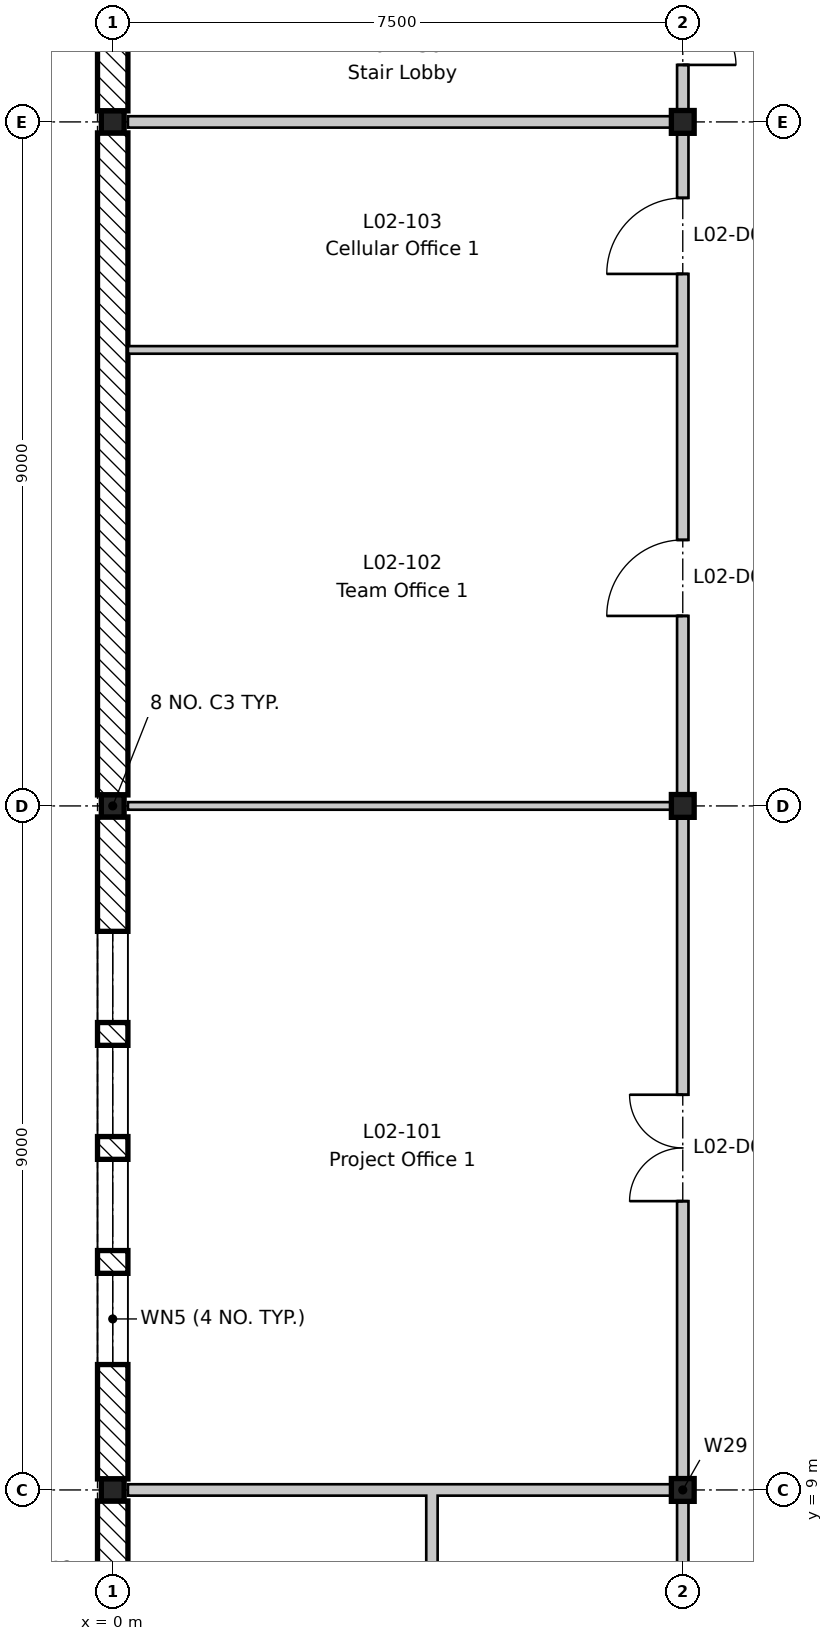
"""IFC4 building model, lengths in metres.
Left out: names, types, materials, properties, quantities, classifications, styles, units other than length and angle.
Written with IfcOpenShell. Run it as: python <this file> out.ifc"""

import sys

from ifc_helpers import new_model, si_unit, direction, frame, frame_2d, origin, origin_2d, place, context, subcontext, project, spatial, rectangle, i_section, extrude, element, fill, save


model = new_model("IFC4")
c1 = context("Model", 3, precision=1e-05, world=origin(), true_north=direction((0.0, 1.0)))
c2 = subcontext(c1, "Body", "Model", "MODEL_VIEW")
j1 = project(units=[si_unit("LENGTHUNIT", "METRE"), si_unit("PLANEANGLEUNIT", "RADIAN")], contexts=[c1])
p1 = place(None, origin())
s1 = spatial("IfcSite", under=j1, at=p1, CompositionType="ELEMENT")
p2 = place(p1, origin())
s2 = spatial("IfcBuilding", under=s1, at=p2, CompositionType="ELEMENT")
p3 = place(p2, frame((0.0, 0.0, 9.9)))
s3 = spatial("IfcBuildingStorey", under=s2, at=p3, CompositionType="ELEMENT", Elevation=9.9)
for number, where, z_axis, x_axis in (
    (1, (0.0, 9.0, -0.2), (0.0, 0.0, 1.0), (1.0, 0.0, 0.0)),
    (2, (0.0, 18.0, -0.2), (0.0, 0.0, 1.0), (1.0, 0.0, 0.0)),
    (3, (0.0, 27.0, -0.2), (0.0, 0.0, 1.0), (1.0, 0.0, 0.0)),
):
    element("IfcColumn", number, at=place(p3, frame(where, z_axis=z_axis, x_axis=x_axis)), inside=s3, PredefinedType="COLUMN", context=c2, shape_type="SweptSolid", body=[
        extrude(i_section(OverallWidth=0.3, OverallDepth=0.29, WebThickness=0.009, FlangeThickness=0.014, FilletRadius=0.027, at=origin_2d()), origin(), (0.0, 0.0, 1.0), 4.5),
    ])
for number, where, z_axis, x_axis in (
    (4, (7.5, 9.0, -0.2), (0.0, 0.0, 1.0), (1.0, 0.0, 0.0)),
    (5, (7.5, 18.0, -0.2), (0.0, 0.0, 1.0), (1.0, 0.0, 0.0)),
    (6, (7.5, 27.0, -0.2), (0.0, 0.0, 1.0), (1.0, 0.0, 0.0)),
):
    element("IfcColumn", number, at=place(p3, frame(where, z_axis=z_axis, x_axis=x_axis)), inside=s3, PredefinedType="COLUMN", context=c2, shape_type="SweptSolid", body=[
        extrude(i_section(OverallWidth=0.3, OverallDepth=0.3, WebThickness=0.011, FlangeThickness=0.019, FilletRadius=0.027, at=origin_2d()), origin(), (0.0, 0.0, 1.0), 4.5),
    ])
p4 = place(p3, frame((0.0, 0.145, 0.0), z_axis=(0.0, 0.0, 1.0), x_axis=(0.0, 1.0, 0.0)))
e7 = element("IfcWall", 7, at=p4, inside=s3, PredefinedType="STANDARD", context=c2, shape_type="SweptSolid", body=[
    extrude(rectangle(XDim=8.71, YDim=0.4, at=frame_2d((4.355, 0.0))), origin(), (0.0, 0.0, 1.0), 3.9),
])
p5 = place(p4, frame((1.805, 0.0, 1.5)))
e8 = element("IfcOpeningElement", 8, at=p5, cuts=e7, PredefinedType="OPENING", context=c2, shape_type="SweptSolid", body=[
    extrude(rectangle(XDim=0.6, YDim=1.2, at=frame_2d((0.3, 0.6))), frame((0.0, 0.21, 0.0), z_axis=(0.0, -1.0, 0.0), x_axis=(1.0, 0.0, 0.0)), (0.0, 0.0, 1.0), 0.42),
])
p6 = place(p4, frame((3.305, 0.0, 1.5)))
e9 = element("IfcOpeningElement", 9, at=p6, cuts=e7, PredefinedType="OPENING", context=c2, shape_type="SweptSolid", body=[
    extrude(rectangle(XDim=0.6, YDim=1.2, at=frame_2d((0.3, 0.6))), frame((0.0, 0.21, 0.0), z_axis=(0.0, -1.0, 0.0), x_axis=(1.0, 0.0, 0.0)), (0.0, 0.0, 1.0), 0.42),
])
p7 = place(p4, frame((4.805, 0.0, 1.5)))
e10 = element("IfcOpeningElement", 10, at=p7, cuts=e7, PredefinedType="OPENING", context=c2, shape_type="SweptSolid", body=[
    extrude(rectangle(XDim=0.6, YDim=1.2, at=frame_2d((0.3, 0.6))), frame((0.0, 0.21, 0.0), z_axis=(0.0, -1.0, 0.0), x_axis=(1.0, 0.0, 0.0)), (0.0, 0.0, 1.0), 0.42),
])
p8 = place(p4, frame((6.305, 0.0, 1.5)))
e11 = element("IfcOpeningElement", 11, at=p8, cuts=e7, PredefinedType="OPENING", context=c2, shape_type="SweptSolid", body=[
    extrude(rectangle(XDim=0.6, YDim=1.2, at=frame_2d((0.3, 0.6))), frame((0.0, 0.21, 0.0), z_axis=(0.0, -1.0, 0.0), x_axis=(1.0, 0.0, 0.0)), (0.0, 0.0, 1.0), 0.42),
])
p9 = place(p3, frame((0.0, 9.145, 0.0), z_axis=(0.0, 0.0, 1.0), x_axis=(0.0, 1.0, 0.0)))
e12 = element("IfcWall", 12, at=p9, inside=s3, PredefinedType="STANDARD", context=c2, shape_type="SweptSolid", body=[
    extrude(rectangle(XDim=8.71, YDim=0.4, at=frame_2d((4.355, 0.0))), origin(), (0.0, 0.0, 1.0), 3.9),
])
p10 = place(p9, frame((1.505, 0.0, 0.6)))
e13 = element("IfcOpeningElement", 13, at=p10, cuts=e12, PredefinedType="OPENING", context=c2, shape_type="SweptSolid", body=[
    extrude(rectangle(XDim=1.2, YDim=3.0, at=frame_2d((0.6, 1.5))), frame((0.0, 0.21, 0.0), z_axis=(0.0, -1.0, 0.0), x_axis=(1.0, 0.0, 0.0)), (0.0, 0.0, 1.0), 0.42),
])
p11 = place(p9, frame((3.005, 0.0, 0.6)))
e14 = element("IfcOpeningElement", 14, at=p11, cuts=e12, PredefinedType="OPENING", context=c2, shape_type="SweptSolid", body=[
    extrude(rectangle(XDim=1.2, YDim=3.0, at=frame_2d((0.6, 1.5))), frame((0.0, 0.21, 0.0), z_axis=(0.0, -1.0, 0.0), x_axis=(1.0, 0.0, 0.0)), (0.0, 0.0, 1.0), 0.42),
])
p12 = place(p9, frame((4.505, 0.0, 0.6)))
e15 = element("IfcOpeningElement", 15, at=p12, cuts=e12, PredefinedType="OPENING", context=c2, shape_type="SweptSolid", body=[
    extrude(rectangle(XDim=1.2, YDim=3.0, at=frame_2d((0.6, 1.5))), frame((0.0, 0.21, 0.0), z_axis=(0.0, -1.0, 0.0), x_axis=(1.0, 0.0, 0.0)), (0.0, 0.0, 1.0), 0.42),
])
p13 = place(p9, frame((6.005, 0.0, 0.6)))
e16 = element("IfcOpeningElement", 16, at=p13, cuts=e12, PredefinedType="OPENING", context=c2, shape_type="SweptSolid", body=[
    extrude(rectangle(XDim=1.2, YDim=3.0, at=frame_2d((0.6, 1.5))), frame((0.0, 0.21, 0.0), z_axis=(0.0, -1.0, 0.0), x_axis=(1.0, 0.0, 0.0)), (0.0, 0.0, 1.0), 0.42),
])
p14 = place(p3, frame((0.0, 18.145, 0.0), z_axis=(0.0, 0.0, 1.0), x_axis=(0.0, 1.0, 0.0)))
e17 = element("IfcWall", 17, at=p14, inside=s3, PredefinedType="STANDARD", context=c2, shape_type="SweptSolid", body=[
    extrude(rectangle(XDim=8.71, YDim=0.4, at=frame_2d((4.355, 0.0))), origin(), (0.0, 0.0, 1.0), 3.9),
])
p15 = place(p3, frame((0.0, 27.145, 0.0), z_axis=(0.0, 0.0, 1.0), x_axis=(0.0, 1.0, 0.0)))
e18 = element("IfcWall", 18, at=p15, inside=s3, PredefinedType="STANDARD", context=c2, shape_type="SweptSolid", body=[
    extrude(rectangle(XDim=8.71, YDim=0.4, at=frame_2d((4.355, 0.0))), origin(), (0.0, 0.0, 1.0), 3.9),
])
p16 = place(p15, frame((3.08, 0.0, 0.9)))
e19 = element("IfcOpeningElement", 19, at=p16, cuts=e18, PredefinedType="OPENING", context=c2, shape_type="SweptSolid", body=[
    extrude(rectangle(XDim=1.05, YDim=2.7, at=frame_2d((0.525, 1.35))), frame((0.0, 0.21, 0.0), z_axis=(0.0, -1.0, 0.0), x_axis=(1.0, 0.0, 0.0)), (0.0, 0.0, 1.0), 0.42),
])
p17 = place(p15, frame((4.58, 0.0, 0.9)))
e20 = element("IfcOpeningElement", 20, at=p17, cuts=e18, PredefinedType="OPENING", context=c2, shape_type="SweptSolid", body=[
    extrude(rectangle(XDim=1.05, YDim=2.7, at=frame_2d((0.525, 1.35))), frame((0.0, 0.21, 0.0), z_axis=(0.0, -1.0, 0.0), x_axis=(1.0, 0.0, 0.0)), (0.0, 0.0, 1.0), 0.42),
])
p18 = place(p3, frame((0.2, 9.0, 0.0), z_axis=(0.0, 0.0, 1.0), x_axis=(1.0, 0.0, 0.0)))
e21 = element("IfcWall", 21, at=p18, inside=s3, PredefinedType="PARTITIONING", context=c2, shape_type="SweptSolid", body=[
    extrude(rectangle(XDim=7.225, YDim=0.15, at=frame_2d((3.613, 0.0))), origin(), (0.0, 0.0, 1.0), 3.95),
])
p19 = place(p3, frame((0.2, 18.0, 0.0), z_axis=(0.0, 0.0, 1.0), x_axis=(1.0, 0.0, 0.0)))
e22 = element("IfcWall", 22, at=p19, inside=s3, PredefinedType="PARTITIONING", context=c2, shape_type="SweptSolid", body=[
    extrude(rectangle(XDim=7.225, YDim=0.1, at=frame_2d((3.613, 0.0))), origin(), (0.0, 0.0, 1.0), 3.95),
])
p20 = place(p3, frame((0.2, 24.0, 0.0), z_axis=(0.0, 0.0, 1.0), x_axis=(1.0, 0.0, 0.0)))
e23 = element("IfcWall", 23, at=p20, inside=s3, PredefinedType="PARTITIONING", context=c2, shape_type="SweptSolid", body=[
    extrude(rectangle(XDim=7.225, YDim=0.1, at=frame_2d((3.613, 0.0))), origin(), (0.0, 0.0, 1.0), 4.3),
])
p21 = place(p3, frame((0.2, 27.0, 0.0), z_axis=(0.0, 0.0, 1.0), x_axis=(1.0, 0.0, 0.0)))
e24 = element("IfcWall", 24, at=p21, inside=s3, PredefinedType="PARTITIONING", context=c2, shape_type="SweptSolid", body=[
    extrude(rectangle(XDim=7.225, YDim=0.15, at=frame_2d((3.613, 0.0))), origin(), (0.0, 0.0, 1.0), 3.95),
])
p22 = place(p3, frame((7.5, -8.8, 0.0), z_axis=(0.0, 0.0, 1.0), x_axis=(0.0, 1.0, 0.0)))
e25 = element("IfcWall", 25, at=p22, inside=s3, PredefinedType="PARTITIONING", context=c2, shape_type="SweptSolid", body=[
    extrude(rectangle(XDim=79.3, YDim=0.15, at=frame_2d((39.65, 0.0))), origin(), (0.0, 0.0, 1.0), 3.78),
])
p23 = place(p22, frame((21.6, 0.0, 0.0)))
e26 = element("IfcOpeningElement", 26, at=p23, cuts=e25, PredefinedType="OPENING", context=c2, shape_type="SweptSolid", body=[
    extrude(rectangle(XDim=1.4, YDim=2.1, at=frame_2d((0.7, 1.05))), frame((0.0, 0.085, 0.0), z_axis=(0.0, -1.0, 0.0), x_axis=(1.0, 0.0, 0.0)), (0.0, 0.0, 1.0), 0.17),
])
p24 = place(p22, frame((29.3, 0.0, 0.0)))
e27 = element("IfcOpeningElement", 27, at=p24, cuts=e25, PredefinedType="OPENING", context=c2, shape_type="SweptSolid", body=[
    extrude(rectangle(XDim=1.0, YDim=2.1, at=frame_2d((0.5, 1.05))), frame((0.0, 0.085, 0.0), z_axis=(0.0, -1.0, 0.0), x_axis=(1.0, 0.0, 0.0)), (0.0, 0.0, 1.0), 0.17),
])
p25 = place(p22, frame((33.8, 0.0, 0.0)))
e28 = element("IfcOpeningElement", 28, at=p25, cuts=e25, PredefinedType="OPENING", context=c2, shape_type="SweptSolid", body=[
    extrude(rectangle(XDim=1.0, YDim=2.1, at=frame_2d((0.5, 1.05))), frame((0.0, 0.085, 0.0), z_axis=(0.0, -1.0, 0.0), x_axis=(1.0, 0.0, 0.0)), (0.0, 0.0, 1.0), 0.17),
])
p26 = place(p22, frame((48.6, 0.0, 0.0)))
e29 = element("IfcOpeningElement", 29, at=p26, cuts=e25, PredefinedType="OPENING", context=c2, shape_type="SweptSolid", body=[
    extrude(rectangle(XDim=1.4, YDim=2.1, at=frame_2d((0.7, 1.05))), frame((0.0, 0.085, 0.0), z_axis=(0.0, -1.0, 0.0), x_axis=(1.0, 0.0, 0.0)), (0.0, 0.0, 1.0), 0.17),
])
p27 = place(p22, frame((56.3, 0.0, 0.0)))
e30 = element("IfcOpeningElement", 30, at=p27, cuts=e25, PredefinedType="OPENING", context=c2, shape_type="SweptSolid", body=[
    extrude(rectangle(XDim=1.0, YDim=2.1, at=frame_2d((0.5, 1.05))), frame((0.0, 0.085, 0.0), z_axis=(0.0, -1.0, 0.0), x_axis=(1.0, 0.0, 0.0)), (0.0, 0.0, 1.0), 0.17),
])
p28 = place(p22, frame((60.8, 0.0, 0.0)))
e31 = element("IfcOpeningElement", 31, at=p28, cuts=e25, PredefinedType="OPENING", context=c2, shape_type="SweptSolid", body=[
    extrude(rectangle(XDim=1.0, YDim=2.1, at=frame_2d((0.5, 1.05))), frame((0.0, 0.085, 0.0), z_axis=(0.0, -1.0, 0.0), x_axis=(1.0, 0.0, 0.0)), (0.0, 0.0, 1.0), 0.17),
])
p29 = place(p22, frame((12.6, 0.0, 0.0)))
e32 = element("IfcOpeningElement", 32, at=p29, cuts=e25, PredefinedType="OPENING", context=c2, shape_type="SweptSolid", body=[
    extrude(rectangle(XDim=1.4, YDim=2.1, at=frame_2d((0.7, 1.05))), frame((0.0, 0.085, 0.0), z_axis=(0.0, -1.0, 0.0), x_axis=(1.0, 0.0, 0.0)), (0.0, 0.0, 1.0), 0.17),
])
p30 = place(p22, frame((3.6, 0.0, 0.0)))
e33 = element("IfcOpeningElement", 33, at=p30, cuts=e25, PredefinedType="OPENING", context=c2, shape_type="SweptSolid", body=[
    extrude(rectangle(XDim=1.4, YDim=2.1, at=frame_2d((0.7, 1.05))), frame((0.0, 0.085, 0.0), z_axis=(0.0, -1.0, 0.0), x_axis=(1.0, 0.0, 0.0)), (0.0, 0.0, 1.0), 0.17),
])
p31 = place(p22, frame((63.55, 0.0, 0.0)))
e34 = element("IfcOpeningElement", 34, at=p31, cuts=e25, PredefinedType="OPENING", context=c2, shape_type="SweptSolid", body=[
    extrude(rectangle(XDim=1.4, YDim=2.1, at=frame_2d((0.7, 1.05))), frame((0.0, 0.085, 0.0), z_axis=(0.0, -1.0, 0.0), x_axis=(1.0, 0.0, 0.0)), (0.0, 0.0, 1.0), 0.17),
])
p32 = place(p22, frame((69.6, 0.0, 0.0)))
e35 = element("IfcOpeningElement", 35, at=p32, cuts=e25, PredefinedType="OPENING", context=c2, shape_type="SweptSolid", body=[
    extrude(rectangle(XDim=1.4, YDim=2.1, at=frame_2d((0.7, 1.05))), frame((0.0, 0.085, 0.0), z_axis=(0.0, -1.0, 0.0), x_axis=(1.0, 0.0, 0.0)), (0.0, 0.0, 1.0), 0.17),
])
p33 = place(p22, frame((42.85, 0.0, 0.0)))
e36 = element("IfcOpeningElement", 36, at=p33, cuts=e25, PredefinedType="OPENING", context=c2, shape_type="SweptSolid", body=[
    extrude(rectangle(XDim=1.0, YDim=2.1, at=frame_2d((0.5, 1.05))), frame((0.0, 0.085, 0.0), z_axis=(0.0, -1.0, 0.0), x_axis=(1.0, 0.0, 0.0)), (0.0, 0.0, 1.0), 0.17),
])
p34 = place(p22, frame((36.55, 0.0, 0.0)))
e37 = element("IfcOpeningElement", 37, at=p34, cuts=e25, PredefinedType="OPENING", context=c2, shape_type="SweptSolid", body=[
    extrude(rectangle(XDim=1.4, YDim=2.1, at=frame_2d((0.7, 1.05))), frame((0.0, 0.085, 0.0), z_axis=(0.0, -1.0, 0.0), x_axis=(1.0, 0.0, 0.0)), (0.0, 0.0, 1.0), 0.17),
])
p35 = place(p22, frame((72.8, 0.0, 0.0)))
e38 = element("IfcOpeningElement", 38, at=p35, cuts=e25, PredefinedType="OPENING", context=c2, shape_type="SweptSolid", body=[
    extrude(rectangle(XDim=1.0, YDim=2.1, at=frame_2d((0.5, 1.05))), frame((0.0, 0.085, 0.0), z_axis=(0.0, -1.0, 0.0), x_axis=(1.0, 0.0, 0.0)), (0.0, 0.0, 1.0), 0.17),
])
p36 = place(p3, frame((4.2, 0.075, 0.0), z_axis=(0.0, 0.0, 1.0), x_axis=(0.0, 1.0, 0.0)))
e39 = element("IfcWall", 39, at=p36, inside=s3, PredefinedType="PARTITIONING", context=c2, shape_type="SweptSolid", body=[
    extrude(rectangle(XDim=8.85, YDim=0.15, at=frame_2d((4.425, 0.0))), origin(), (0.0, 0.0, 1.0), 4.3),
])
p37 = place(p36, frame((0.975, 0.0, 0.0)))
e40 = element("IfcOpeningElement", 40, at=p37, cuts=e39, PredefinedType="OPENING", context=c2, shape_type="SweptSolid", body=[
    extrude(rectangle(XDim=0.9, YDim=2.1, at=frame_2d((0.45, 1.05))), frame((0.0, 0.085, 0.0), z_axis=(0.0, -1.0, 0.0), x_axis=(1.0, 0.0, 0.0)), (0.0, 0.0, 1.0), 0.17),
])
p38 = place(p36, frame((3.975, 0.0, 0.0)))
e41 = element("IfcOpeningElement", 41, at=p38, cuts=e39, PredefinedType="OPENING", context=c2, shape_type="SweptSolid", body=[
    extrude(rectangle(XDim=0.9, YDim=2.1, at=frame_2d((0.45, 1.05))), frame((0.0, 0.085, 0.0), z_axis=(0.0, -1.0, 0.0), x_axis=(1.0, 0.0, 0.0)), (0.0, 0.0, 1.0), 0.17),
])
p39 = place(p36, frame((6.925, 0.0, 0.0)))
e42 = element("IfcOpeningElement", 42, at=p39, cuts=e39, PredefinedType="OPENING", context=c2, shape_type="SweptSolid", body=[
    extrude(rectangle(XDim=1.0, YDim=2.1, at=frame_2d((0.5, 1.05))), frame((0.0, 0.085, 0.0), z_axis=(0.0, -1.0, 0.0), x_axis=(1.0, 0.0, 0.0)), (0.0, 0.0, 1.0), 0.17),
])
p40 = place(p10, origin())
e43 = element("IfcWindow", 43, at=p40, inside=s3, PartitioningType="SINGLE_PANEL", PredefinedType="WINDOW", context=c2, shape_type="SweptSolid", body=[
    extrude(rectangle(XDim=1.2, YDim=3.0, at=frame_2d((0.6, 1.5))), frame((0.0, 0.03, 0.0), z_axis=(0.0, -1.0, 0.0), x_axis=(1.0, 0.0, 0.0)), (0.0, 0.0, 1.0), 0.06),
])
fill(e13, e43)
p41 = place(p11, origin())
e44 = element("IfcWindow", 44, at=p41, inside=s3, PartitioningType="SINGLE_PANEL", PredefinedType="WINDOW", context=c2, shape_type="SweptSolid", body=[
    extrude(rectangle(XDim=1.2, YDim=3.0, at=frame_2d((0.6, 1.5))), frame((0.0, 0.03, 0.0), z_axis=(0.0, -1.0, 0.0), x_axis=(1.0, 0.0, 0.0)), (0.0, 0.0, 1.0), 0.06),
])
fill(e14, e44)
p42 = place(p12, origin())
e45 = element("IfcWindow", 45, at=p42, inside=s3, PartitioningType="SINGLE_PANEL", PredefinedType="WINDOW", context=c2, shape_type="SweptSolid", body=[
    extrude(rectangle(XDim=1.2, YDim=3.0, at=frame_2d((0.6, 1.5))), frame((0.0, 0.03, 0.0), z_axis=(0.0, -1.0, 0.0), x_axis=(1.0, 0.0, 0.0)), (0.0, 0.0, 1.0), 0.06),
])
fill(e15, e45)
p43 = place(p13, origin())
e46 = element("IfcWindow", 46, at=p43, inside=s3, PartitioningType="SINGLE_PANEL", PredefinedType="WINDOW", context=c2, shape_type="SweptSolid", body=[
    extrude(rectangle(XDim=1.2, YDim=3.0, at=frame_2d((0.6, 1.5))), frame((0.0, 0.03, 0.0), z_axis=(0.0, -1.0, 0.0), x_axis=(1.0, 0.0, 0.0)), (0.0, 0.0, 1.0), 0.06),
])
fill(e16, e46)
p44 = place(p23, origin())
e47 = element("IfcDoor", 47, at=p44, inside=s3, OperationType="DOUBLE_DOOR_SINGLE_SWING", PredefinedType="DOOR", context=c2, shape_type="SweptSolid", body=[
    extrude(rectangle(XDim=1.4, YDim=2.1, at=frame_2d((0.7, 1.05))), frame((0.0, 0.025, 0.0), z_axis=(0.0, -1.0, 0.0), x_axis=(1.0, 0.0, 0.0)), (0.0, 0.0, 1.0), 0.05),
])
fill(e26, e47)
p45 = place(p24, origin())
e48 = element("IfcDoor", 48, at=p45, inside=s3, OperationType="SINGLE_SWING_LEFT", PredefinedType="DOOR", context=c2, shape_type="SweptSolid", body=[
    extrude(rectangle(XDim=1.0, YDim=2.1, at=frame_2d((0.5, 1.05))), frame((0.0, 0.025, 0.0), z_axis=(0.0, -1.0, 0.0), x_axis=(1.0, 0.0, 0.0)), (0.0, 0.0, 1.0), 0.05),
])
fill(e27, e48)
p46 = place(p25, origin())
e49 = element("IfcDoor", 49, at=p46, inside=s3, OperationType="SINGLE_SWING_LEFT", PredefinedType="DOOR", context=c2, shape_type="SweptSolid", body=[
    extrude(rectangle(XDim=1.0, YDim=2.1, at=frame_2d((0.5, 1.05))), frame((0.0, 0.025, 0.0), z_axis=(0.0, -1.0, 0.0), x_axis=(1.0, 0.0, 0.0)), (0.0, 0.0, 1.0), 0.05),
])
fill(e28, e49)
p47 = place(p34, frame((1.4, 0.0, 0.0), z_axis=(0.0, 0.0, 1.0), x_axis=(-1.0, 0.0, 0.0)))
e50 = element("IfcDoor", 50, at=p47, inside=s3, OperationType="DOUBLE_DOOR_SINGLE_SWING", PredefinedType="DOOR", context=c2, shape_type="SweptSolid", body=[
    extrude(rectangle(XDim=1.4, YDim=2.1, at=frame_2d((0.7, 1.05))), frame((0.0, 0.025, 0.0), z_axis=(0.0, -1.0, 0.0), x_axis=(1.0, 0.0, 0.0)), (0.0, 0.0, 1.0), 0.05),
])
fill(e37, e50)
save(model, sys.argv[1])
